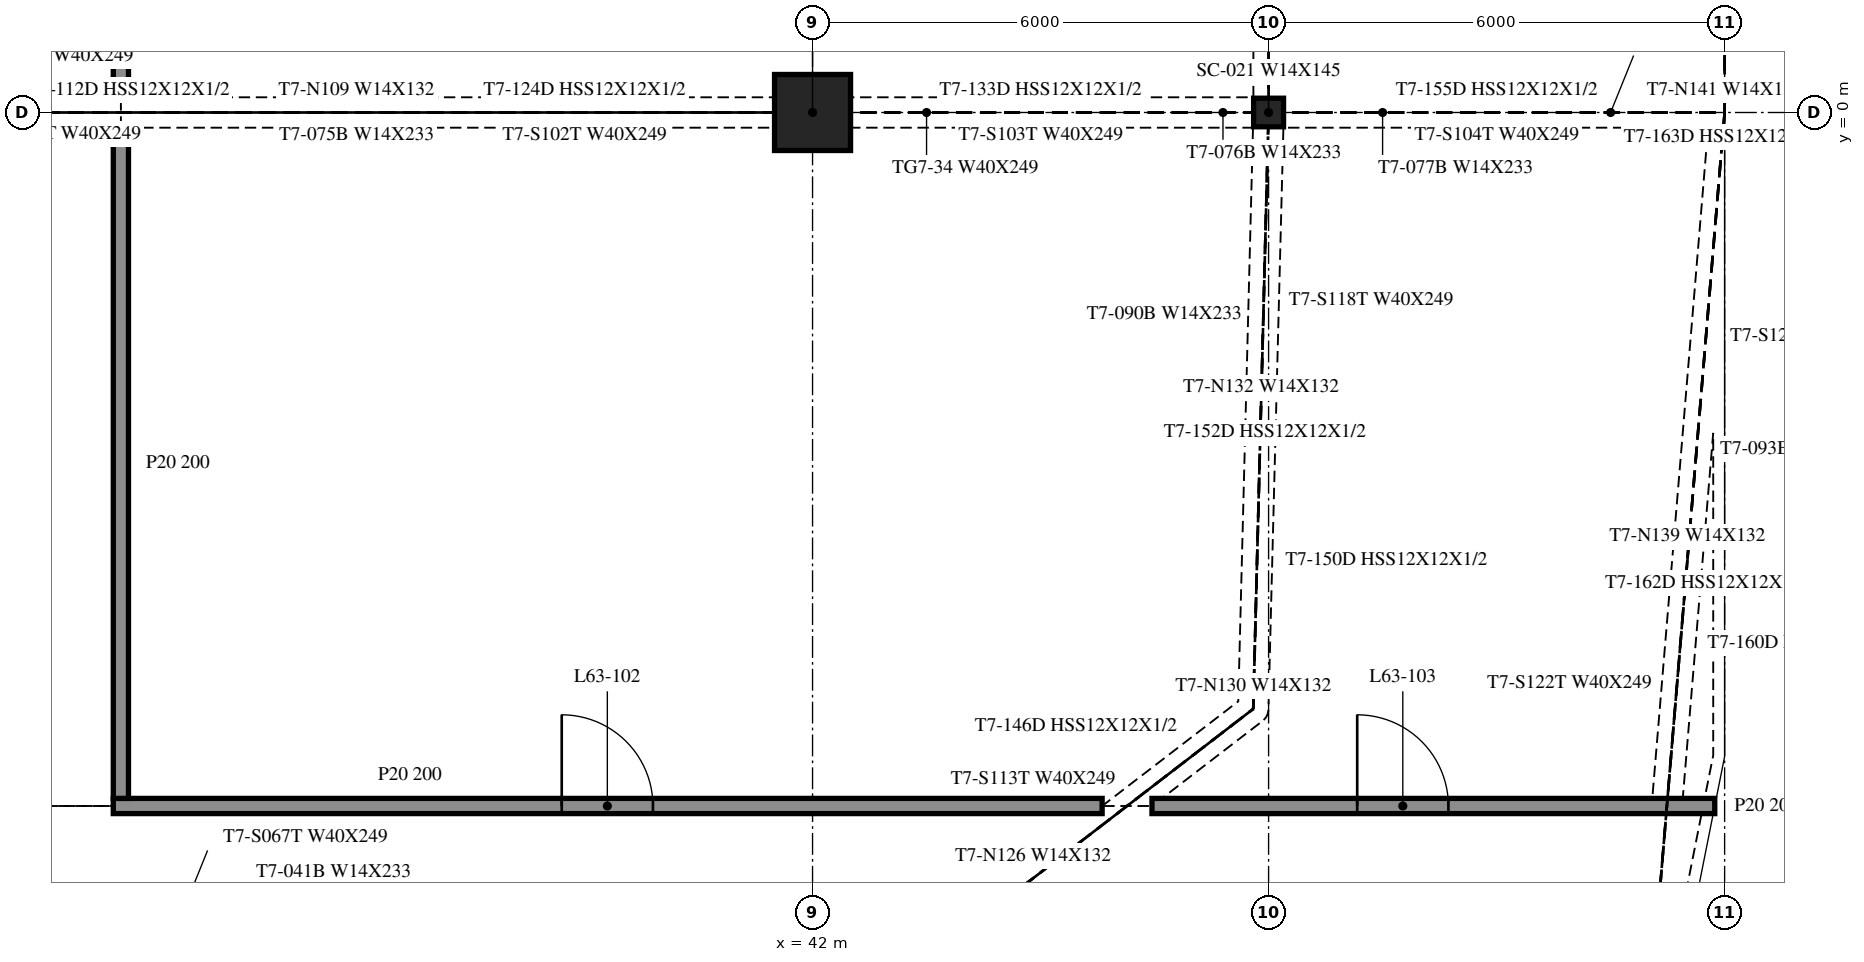
"""IFC4 building model, lengths in metres.
Left out: names, types, materials, properties, quantities, classifications, styles, units other than length and angle.
Written with IfcOpenShell. Run it as: python <this file> out.ifc"""

import sys

from ifc_helpers import new_model, si_unit, direction, frame, frame_2d, origin, origin_2d, place, context, subcontext, project, spatial, rectangle, i_section, extrude, element, fill, save


model = new_model("IFC4")
c1 = context("Model", 3, precision=1e-05, world=origin(), true_north=direction((0.0, 1.0)))
c2 = subcontext(c1, "Body", "Model", "MODEL_VIEW")
j1 = project(units=[si_unit("LENGTHUNIT", "METRE"), si_unit("PLANEANGLEUNIT", "RADIAN")], contexts=[c1])
p1 = place(None, origin())
s1 = spatial("IfcSite", under=j1, at=p1, CompositionType="ELEMENT")
p2 = place(p1, origin())
s2 = spatial("IfcBuilding", under=s1, at=p2, CompositionType="ELEMENT")
p3 = place(p2, frame((0.0, 0.0, 259.0)))
s3 = spatial("IfcBuildingStorey", under=s2, at=p3, CompositionType="ELEMENT", Elevation=259.0)
p4 = place(p3, frame((42.0, 0.0, -0.4), z_axis=(0.0, 0.0, 1.0), x_axis=(1.0, 0.0, 0.0)))
e1 = element("IfcColumn", 1, at=p4, inside=s3, PredefinedType="COLUMN", context=c2, shape_type="SweptSolid", body=[
    extrude(rectangle(XDim=1.0, YDim=1.0, at=origin_2d()), origin(), (0.0, 0.0, 1.0), 4.36),
])
p5 = place(p3, frame((48.0, 0.0, -0.4), z_axis=(0.0, 0.0, 1.0), x_axis=(1.0, 0.0, 0.0)))
e2 = element("IfcColumn", 2, at=p5, inside=s3, PredefinedType="COLUMN", context=c2, shape_type="SweptSolid", body=[
    extrude(i_section(OverallWidth=0.394, OverallDepth=0.376, WebThickness=0.017, FlangeThickness=0.028, at=origin_2d()), origin(), (0.0, 0.0, 1.0), 4.36),
])
p6 = place(p3, frame((32.8, -9.125, 0.0), z_axis=(0.0, 0.0, 1.0), x_axis=(1.0, 0.0, 0.0)))
e3 = element("IfcWall", 3, at=p6, inside=s3, PredefinedType="PARTITIONING", context=c2, shape_type="SweptSolid", body=[
    extrude(rectangle(XDim=13.01, YDim=0.2, at=frame_2d((6.505, 0.0))), origin(), (0.0, 0.0, 1.0), 3.96),
])
p7 = place(p6, frame((5.9, 0.0, 0.0)))
e4 = element("IfcOpeningElement", 4, at=p7, cuts=e3, PredefinedType="OPENING", context=c2, shape_type="SweptSolid", body=[
    extrude(rectangle(XDim=1.2, YDim=2.1, at=frame_2d((0.6, 1.05))), frame((0.0, 0.11, 0.0), z_axis=(0.0, -1.0, 0.0), x_axis=(1.0, 0.0, 0.0)), (0.0, 0.0, 1.0), 0.22),
])
p8 = place(p3, frame((46.466, -9.125, 0.0), z_axis=(0.0, 0.0, 1.0), x_axis=(1.0, 0.0, 0.0)))
e5 = element("IfcWall", 5, at=p8, inside=s3, PredefinedType="PARTITIONING", context=c2, shape_type="SweptSolid", body=[
    extrude(rectangle(XDim=7.404, YDim=0.2, at=frame_2d((3.702, 0.0))), origin(), (0.0, 0.0, 1.0), 3.96),
])
p9 = place(p8, frame((2.7, 0.0, 0.0)))
e6 = element("IfcOpeningElement", 6, at=p9, cuts=e5, PredefinedType="OPENING", context=c2, shape_type="SweptSolid", body=[
    extrude(rectangle(XDim=1.2, YDim=2.1, at=frame_2d((0.6, 1.05))), frame((0.0, 0.11, 0.0), z_axis=(0.0, -1.0, 0.0), x_axis=(1.0, 0.0, 0.0)), (0.0, 0.0, 1.0), 0.22),
])
p10 = place(p3, frame((32.9, -9.025, 0.0), z_axis=(0.0, 0.0, 1.0), x_axis=(0.0, 1.0, 0.0)))
e7 = element("IfcWall", 7, at=p10, inside=s3, PredefinedType="PARTITIONING", context=c2, shape_type="SweptSolid", body=[
    extrude(rectangle(XDim=8.825, YDim=0.2, at=frame_2d((4.413, 0.0))), origin(), (0.0, 0.0, 1.0), 3.96),
])
p11 = place(p3, frame((32.9, 0.2, 0.0), z_axis=(0.0, 0.0, 1.0), x_axis=(0.0, 1.0, 0.0)))
e8 = element("IfcWall", 8, at=p11, inside=s3, PredefinedType="PARTITIONING", context=c2, shape_type="SweptSolid", body=[
    extrude(rectangle(XDim=11.1, YDim=0.2, at=frame_2d((5.55, 0.0))), origin(), (0.0, 0.0, 1.0), 3.96),
])
p12 = place(p11, frame((5.1, 0.0, 0.0)))
e9 = element("IfcOpeningElement", 9, at=p12, cuts=e8, PredefinedType="OPENING", context=c2, shape_type="SweptSolid", body=[
    extrude(rectangle(XDim=1.0, YDim=2.1, at=frame_2d((0.5, 1.05))), frame((0.0, 0.11, 0.0), z_axis=(0.0, -1.0, 0.0), x_axis=(1.0, 0.0, 0.0)), (0.0, 0.0, 1.0), 0.22),
])
p13 = place(p7, origin())
e10 = element("IfcDoor", 10, at=p13, inside=s3, OperationType="SINGLE_SWING_LEFT", PredefinedType="DOOR", context=c2, shape_type="SweptSolid", body=[
    extrude(rectangle(XDim=1.2, YDim=2.1, at=frame_2d((0.6, 1.05))), frame((0.0, 0.025, 0.0), z_axis=(0.0, -1.0, 0.0), x_axis=(1.0, 0.0, 0.0)), (0.0, 0.0, 1.0), 0.05),
])
fill(e4, e10)
p14 = place(p9, origin())
e11 = element("IfcDoor", 11, at=p14, inside=s3, OperationType="SINGLE_SWING_RIGHT", PredefinedType="DOOR", context=c2, shape_type="SweptSolid", body=[
    extrude(rectangle(XDim=1.2, YDim=2.1, at=frame_2d((0.6, 1.05))), frame((0.0, 0.025, 0.0), z_axis=(0.0, -1.0, 0.0), x_axis=(1.0, 0.0, 0.0)), (0.0, 0.0, 1.0), 0.05),
])
fill(e6, e11)
save(model, sys.argv[1])
